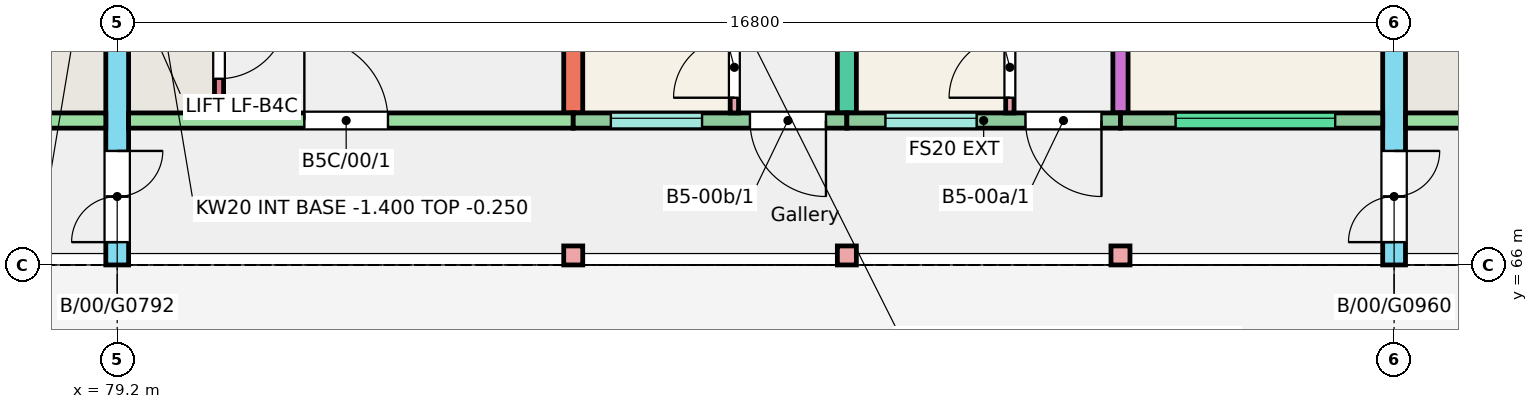
"""IFC4 building model, lengths in metres.
Left out: names, types, materials, properties, quantities, classifications, styles, units other than length and angle.
Written with IfcOpenShell. Run it as: python <this file> out.ifc"""

import sys

from ifc_helpers import new_model, si_unit, direction, frame, frame_2d, origin, origin_2d, place, context, subcontext, project, spatial, rectangle, extrude, element, fill, save


model = new_model("IFC4")
c1 = context("Model", 3, precision=1e-05, world=origin(), true_north=direction((0.0, 1.0)))
c2 = subcontext(c1, "Body", "Model", "MODEL_VIEW")
j1 = project(units=[si_unit("LENGTHUNIT", "METRE"), si_unit("PLANEANGLEUNIT", "RADIAN")], contexts=[c1])
p1 = place(None, origin())
s1 = spatial("IfcSite", under=j1, at=p1, CompositionType="ELEMENT")
p2 = place(p1, origin())
s2 = spatial("IfcBuilding", under=s1, at=p2, CompositionType="ELEMENT")
p3 = place(p2, origin())
s3 = spatial("IfcBuildingStorey", under=s2, at=p3, CompositionType="ELEMENT", Elevation=0.0)
p4 = place(p3, frame((79.2, 66.0, -0.25), z_axis=(0.0, 0.0, 1.0), x_axis=(0.0, 1.0, 0.0)))
e1 = element("IfcWall", 1, at=p4, inside=s3, PredefinedType="SHEAR", context=c2, shape_type="SweptSolid", body=[
    extrude(rectangle(XDim=11.0, YDim=0.3, at=frame_2d((5.5, 0.0))), origin(), (0.0, 0.0, 1.0), 3.25),
])
p5 = place(p4, frame((0.3, 0.0, 0.25)))
e2 = element("IfcOpeningElement", 2, at=p5, cuts=e1, PredefinedType="OPENING", context=c2, shape_type="SweptSolid", body=[
    extrude(rectangle(XDim=1.2, YDim=2.1, at=frame_2d((0.6, 1.05))), frame((0.0, 0.16, 0.0), z_axis=(0.0, -1.0, 0.0), x_axis=(1.0, 0.0, 0.0)), (0.0, 0.0, 1.0), 0.32),
])
for number, where, z_axis, x_axis in (
    (3, (85.2, 68.0, -0.25), (0.0, 0.0, 1.0), (0.0, 1.0, 0.0)),
    (4, (88.8, 68.0, -0.25), (0.0, 0.0, 1.0), (0.0, 1.0, 0.0)),
):
    element("IfcWall", number, at=place(p3, frame(where, z_axis=z_axis, x_axis=x_axis)), inside=s3, PredefinedType="SHEAR", context=c2, shape_type="SweptSolid", body=[
        extrude(rectangle(XDim=9.0, YDim=0.25, at=frame_2d((4.5, 0.0))), origin(), (0.0, 0.0, 1.0), 3.25),
    ])
p6 = place(p3, frame((92.4, 68.0, -0.25), z_axis=(0.0, 0.0, 1.0), x_axis=(0.0, 1.0, 0.0)))
e5 = element("IfcWall", 5, at=p6, inside=s3, PredefinedType="SHEAR", context=c2, shape_type="SweptSolid", body=[
    extrude(rectangle(XDim=9.0, YDim=0.2, at=frame_2d((4.5, 0.0))), origin(), (0.0, 0.0, 1.0), 3.25),
])
p7 = place(p6, frame((2.4, 0.0, 0.25)))
e6 = element("IfcOpeningElement", 6, at=p7, cuts=e5, PredefinedType="OPENING", context=c2, shape_type="SweptSolid", body=[
    extrude(rectangle(XDim=1.2, YDim=2.1, at=frame_2d((0.6, 1.05))), frame((0.0, 0.11, 0.0), z_axis=(0.0, -1.0, 0.0), x_axis=(1.0, 0.0, 0.0)), (0.0, 0.0, 1.0), 0.22),
])
p8 = place(p6, frame((6.4, 0.0, 0.25)))
e7 = element("IfcOpeningElement", 7, at=p8, cuts=e5, PredefinedType="OPENING", context=c2, shape_type="SweptSolid", body=[
    extrude(rectangle(XDim=1.2, YDim=2.1, at=frame_2d((0.6, 1.05))), frame((0.0, 0.11, 0.0), z_axis=(0.0, -1.0, 0.0), x_axis=(1.0, 0.0, 0.0)), (0.0, 0.0, 1.0), 0.22),
])
p9 = place(p3, frame((96.0, 66.0, -0.25), z_axis=(0.0, 0.0, 1.0), x_axis=(0.0, 1.0, 0.0)))
e8 = element("IfcWall", 8, at=p9, inside=s3, PredefinedType="SHEAR", context=c2, shape_type="SweptSolid", body=[
    extrude(rectangle(XDim=11.0, YDim=0.3, at=frame_2d((5.5, 0.0))), origin(), (0.0, 0.0, 1.0), 3.25),
])
p10 = place(p9, frame((0.3, 0.0, 0.25)))
e9 = element("IfcOpeningElement", 9, at=p10, cuts=e8, PredefinedType="OPENING", context=c2, shape_type="SweptSolid", body=[
    extrude(rectangle(XDim=1.2, YDim=2.1, at=frame_2d((0.6, 1.05))), frame((0.0, 0.16, 0.0), z_axis=(0.0, -1.0, 0.0), x_axis=(1.0, 0.0, 0.0)), (0.0, 0.0, 1.0), 0.32),
])
p11 = place(p3, frame((73.2, 67.9, -0.25), z_axis=(0.0, 0.0, 1.0), x_axis=(1.0, 0.0, 0.0)))
e10 = element("IfcWall", 10, at=p11, inside=s3, PredefinedType="SHEAR", context=c2, shape_type="SweptSolid", body=[
    extrude(rectangle(XDim=5.85, YDim=0.2, at=frame_2d((2.925, 0.0))), origin(), (0.0, 0.0, 1.0), 3.25),
])
p12 = place(p11, frame((2.438, 0.0, 0.25)))
e11 = element("IfcOpeningElement", 11, at=p12, cuts=e10, PredefinedType="OPENING", context=c2, shape_type="SweptSolid", body=[
    extrude(rectangle(XDim=1.1, YDim=2.1, at=frame_2d((0.55, 1.05))), frame((0.0, 0.11, 0.0), z_axis=(0.0, -1.0, 0.0), x_axis=(1.0, 0.0, 0.0)), (0.0, 0.0, 1.0), 0.22),
])
p13 = place(p3, frame((79.35, 67.9, -0.25), z_axis=(0.0, 0.0, 1.0), x_axis=(1.0, 0.0, 0.0)))
e12 = element("IfcWall", 12, at=p13, inside=s3, PredefinedType="SHEAR", context=c2, shape_type="SweptSolid", body=[
    extrude(rectangle(XDim=5.85, YDim=0.2, at=frame_2d((2.925, 0.0))), origin(), (0.0, 0.0, 1.0), 3.25),
])
p14 = place(p13, frame((2.312, 0.0, 0.25)))
e13 = element("IfcOpeningElement", 13, at=p14, cuts=e12, PredefinedType="OPENING", context=c2, shape_type="SweptSolid", body=[
    extrude(rectangle(XDim=1.1, YDim=2.1, at=frame_2d((0.55, 1.05))), frame((0.0, 0.11, 0.0), z_axis=(0.0, -1.0, 0.0), x_axis=(1.0, 0.0, 0.0)), (0.0, 0.0, 1.0), 0.22),
])
p15 = place(p3, frame((80.54, 68.0, -0.25), z_axis=(0.0, 0.0, 1.0), x_axis=(0.0, 1.0, 0.0)))
e14 = element("IfcWall", 14, at=p15, inside=s3, PredefinedType="SHEAR", context=c2, shape_type="SweptSolid", body=[
    extrude(rectangle(XDim=1.72, YDim=0.12, at=frame_2d((0.86, 0.0))), origin(), (0.0, 0.0, 1.0), 3.25),
])
p16 = place(p15, frame((0.45, 0.0, 0.25)))
e15 = element("IfcOpeningElement", 15, at=p16, cuts=e14, PredefinedType="OPENING", context=c2, shape_type="SweptSolid", body=[
    extrude(rectangle(XDim=0.9, YDim=2.1, at=frame_2d((0.45, 1.05))), frame((0.0, 0.07, 0.0), z_axis=(0.0, -1.0, 0.0), x_axis=(1.0, 0.0, 0.0)), (0.0, 0.0, 1.0), 0.14),
])
p17 = place(p3, frame((85.2, 67.9, -0.25), z_axis=(0.0, 0.0, 1.0), x_axis=(1.0, 0.0, 0.0)))
e16 = element("IfcWall", 16, at=p17, inside=s3, PredefinedType="SOLIDWALL", context=c2, shape_type="SweptSolid", body=[
    extrude(rectangle(XDim=3.6, YDim=0.2, at=frame_2d((1.8, 0.0))), origin(), (0.0, 0.0, 1.0), 3.25),
])
p18 = place(p17, frame((0.495, 0.0, 1.35)))
e17 = element("IfcOpeningElement", 17, at=p18, cuts=e16, PredefinedType="OPENING", context=c2, shape_type="SweptSolid", body=[
    extrude(rectangle(XDim=1.2, YDim=1.3, at=frame_2d((0.6, 0.65))), frame((0.0, 0.11, 0.0), z_axis=(0.0, -1.0, 0.0), x_axis=(1.0, 0.0, 0.0)), (0.0, 0.0, 1.0), 0.22),
])
p19 = place(p17, frame((2.325, 0.0, 0.25)))
e18 = element("IfcOpeningElement", 18, at=p19, cuts=e16, PredefinedType="OPENING", context=c2, shape_type="SweptSolid", body=[
    extrude(rectangle(XDim=1.0, YDim=2.1, at=frame_2d((0.5, 1.05))), frame((0.0, 0.11, 0.0), z_axis=(0.0, -1.0, 0.0), x_axis=(1.0, 0.0, 0.0)), (0.0, 0.0, 1.0), 0.22),
])
p20 = place(p3, frame((88.8, 67.9, -0.25), z_axis=(0.0, 0.0, 1.0), x_axis=(1.0, 0.0, 0.0)))
e19 = element("IfcWall", 19, at=p20, inside=s3, PredefinedType="SOLIDWALL", context=c2, shape_type="SweptSolid", body=[
    extrude(rectangle(XDim=3.6, YDim=0.2, at=frame_2d((1.8, 0.0))), origin(), (0.0, 0.0, 1.0), 3.25),
])
p21 = place(p20, frame((0.508, 0.0, 1.35)))
e20 = element("IfcOpeningElement", 20, at=p21, cuts=e19, PredefinedType="OPENING", context=c2, shape_type="SweptSolid", body=[
    extrude(rectangle(XDim=1.2, YDim=1.3, at=frame_2d((0.6, 0.65))), frame((0.0, 0.11, 0.0), z_axis=(0.0, -1.0, 0.0), x_axis=(1.0, 0.0, 0.0)), (0.0, 0.0, 1.0), 0.22),
])
p22 = place(p20, frame((2.35, 0.0, 0.25)))
e21 = element("IfcOpeningElement", 21, at=p22, cuts=e19, PredefinedType="OPENING", context=c2, shape_type="SweptSolid", body=[
    extrude(rectangle(XDim=1.0, YDim=2.1, at=frame_2d((0.5, 1.05))), frame((0.0, 0.11, 0.0), z_axis=(0.0, -1.0, 0.0), x_axis=(1.0, 0.0, 0.0)), (0.0, 0.0, 1.0), 0.22),
])
p23 = place(p3, frame((92.4, 67.9, -0.25), z_axis=(0.0, 0.0, 1.0), x_axis=(1.0, 0.0, 0.0)))
e22 = element("IfcWall", 22, at=p23, inside=s3, PredefinedType="SOLIDWALL", context=c2, shape_type="SweptSolid", body=[
    extrude(rectangle(XDim=3.45, YDim=0.2, at=frame_2d((1.725, 0.0))), origin(), (0.0, 0.0, 1.0), 3.25),
])
p24 = place(p23, frame((0.725, 0.0, 1.45)))
e23 = element("IfcOpeningElement", 23, at=p24, cuts=e22, PredefinedType="OPENING", context=c2, shape_type="SweptSolid", body=[
    extrude(rectangle(XDim=2.1, YDim=1.2, at=frame_2d((1.05, 0.6))), frame((0.0, 0.11, 0.0), z_axis=(0.0, -1.0, 0.0), x_axis=(1.0, 0.0, 0.0)), (0.0, 0.0, 1.0), 0.22),
])
p25 = place(p3, frame((96.15, 67.9, -0.25), z_axis=(0.0, 0.0, 1.0), x_axis=(1.0, 0.0, 0.0)))
e24 = element("IfcWall", 24, at=p25, inside=s3, PredefinedType="SHEAR", context=c2, shape_type="SweptSolid", body=[
    extrude(rectangle(XDim=5.85, YDim=0.2, at=frame_2d((2.925, 0.0))), origin(), (0.0, 0.0, 1.0), 3.25),
])
p26 = place(p25, frame((2.312, 0.0, 0.25)))
e25 = element("IfcOpeningElement", 25, at=p26, cuts=e24, PredefinedType="OPENING", context=c2, shape_type="SweptSolid", body=[
    extrude(rectangle(XDim=1.1, YDim=2.1, at=frame_2d((0.55, 1.05))), frame((0.0, 0.11, 0.0), z_axis=(0.0, -1.0, 0.0), x_axis=(1.0, 0.0, 0.0)), (0.0, 0.0, 1.0), 0.22),
])
for number, where, z_axis, x_axis in (
    (26, (85.2, 66.125, -0.25), (0.0, 0.0, 1.0), (1.0, 0.0, 0.0)),
    (27, (88.8, 66.125, -0.25), (0.0, 0.0, 1.0), (1.0, 0.0, 0.0)),
    (28, (92.4, 66.125, -0.25), (0.0, 0.0, 1.0), (1.0, 0.0, 0.0)),
):
    element("IfcColumn", number, at=place(p3, frame(where, z_axis=z_axis, x_axis=x_axis)), inside=s3, PredefinedType="COLUMN", context=c2, shape_type="SweptSolid", body=[
        extrude(rectangle(XDim=0.25, YDim=0.25, at=origin_2d()), origin(), (0.0, 0.0, 1.0), 3.25),
    ])
p27 = place(p3, frame((90.945, 68.0, 0.0), z_axis=(0.0, 0.0, 1.0), x_axis=(0.0, 1.0, 0.0)))
e29 = element("IfcWall", 29, at=p27, inside=s3, PredefinedType="PARTITIONING", context=c2, shape_type="SweptSolid", body=[
    extrude(rectangle(XDim=4.7, YDim=0.11, at=frame_2d((2.35, 0.0))), origin(), (0.0, 0.0, 1.0), 2.8),
])
p28 = place(p27, frame((0.2, 0.0, 0.0)))
e30 = element("IfcOpeningElement", 30, at=p28, cuts=e29, PredefinedType="OPENING", context=c2, shape_type="SweptSolid", body=[
    extrude(rectangle(XDim=0.8, YDim=2.1, at=frame_2d((0.4, 1.05))), frame((0.0, 0.065, 0.0), z_axis=(0.0, -1.0, 0.0), x_axis=(1.0, 0.0, 0.0)), (0.0, 0.0, 1.0), 0.13),
])
p29 = place(p27, frame((3.75, 0.0, 0.0)))
e31 = element("IfcOpeningElement", 31, at=p29, cuts=e29, PredefinedType="OPENING", context=c2, shape_type="SweptSolid", body=[
    extrude(rectangle(XDim=0.8, YDim=2.1, at=frame_2d((0.4, 1.05))), frame((0.0, 0.065, 0.0), z_axis=(0.0, -1.0, 0.0), x_axis=(1.0, 0.0, 0.0)), (0.0, 0.0, 1.0), 0.13),
])
p30 = place(p3, frame((87.32, 68.0, 0.0), z_axis=(0.0, 0.0, 1.0), x_axis=(0.0, 1.0, 0.0)))
e32 = element("IfcWall", 32, at=p30, inside=s3, PredefinedType="PARTITIONING", context=c2, shape_type="SweptSolid", body=[
    extrude(rectangle(XDim=4.7, YDim=0.11, at=frame_2d((2.35, 0.0))), origin(), (0.0, 0.0, 1.0), 2.8),
])
p31 = place(p30, frame((0.2, 0.0, 0.0)))
e33 = element("IfcOpeningElement", 33, at=p31, cuts=e32, PredefinedType="OPENING", context=c2, shape_type="SweptSolid", body=[
    extrude(rectangle(XDim=0.8, YDim=2.1, at=frame_2d((0.4, 1.05))), frame((0.0, 0.065, 0.0), z_axis=(0.0, -1.0, 0.0), x_axis=(1.0, 0.0, 0.0)), (0.0, 0.0, 1.0), 0.13),
])
p32 = place(p30, frame((3.75, 0.0, 0.0)))
e34 = element("IfcOpeningElement", 34, at=p32, cuts=e32, PredefinedType="OPENING", context=c2, shape_type="SweptSolid", body=[
    extrude(rectangle(XDim=0.8, YDim=2.1, at=frame_2d((0.4, 1.05))), frame((0.0, 0.065, 0.0), z_axis=(0.0, -1.0, 0.0), x_axis=(1.0, 0.0, 0.0)), (0.0, 0.0, 1.0), 0.13),
])
p33 = place(p24, origin())
e35 = element("IfcWindow", 35, at=p33, inside=s3, PartitioningType="SINGLE_PANEL", PredefinedType="WINDOW", context=c2, shape_type="SweptSolid", body=[
    extrude(rectangle(XDim=2.1, YDim=1.2, at=frame_2d((1.05, 0.6))), frame((0.0, 0.06, 0.0), z_axis=(0.0, -1.0, 0.0), x_axis=(1.0, 0.0, 0.0)), (0.0, 0.0, 1.0), 0.06),
])
fill(e23, e35)
p34 = place(p21, origin())
e36 = element("IfcWindow", 36, at=p34, inside=s3, PartitioningType="SINGLE_PANEL", PredefinedType="WINDOW", context=c2, shape_type="SweptSolid", body=[
    extrude(rectangle(XDim=1.2, YDim=1.3, at=frame_2d((0.6, 0.65))), frame((0.0, 0.06, 0.0), z_axis=(0.0, -1.0, 0.0), x_axis=(1.0, 0.0, 0.0)), (0.0, 0.0, 1.0), 0.06),
])
fill(e20, e36)
p35 = place(p18, origin())
e37 = element("IfcWindow", 37, at=p35, inside=s3, PartitioningType="SINGLE_PANEL", PredefinedType="WINDOW", context=c2, shape_type="SweptSolid", body=[
    extrude(rectangle(XDim=1.2, YDim=1.3, at=frame_2d((0.6, 0.65))), frame((0.0, 0.06, 0.0), z_axis=(0.0, -1.0, 0.0), x_axis=(1.0, 0.0, 0.0)), (0.0, 0.0, 1.0), 0.06),
])
fill(e17, e37)
p36 = place(p22, origin())
e38 = element("IfcDoor", 38, at=p36, inside=s3, OperationType="SINGLE_SWING_RIGHT", PredefinedType="DOOR", context=c2, shape_type="SweptSolid", body=[
    extrude(rectangle(XDim=1.0, YDim=2.1, at=frame_2d((0.5, 1.05))), frame((0.0, 0.025, 0.0), z_axis=(0.0, -1.0, 0.0), x_axis=(1.0, 0.0, 0.0)), (0.0, 0.0, 1.0), 0.05),
])
fill(e21, e38)
p37 = place(p28, origin())
e39 = element("IfcDoor", 39, at=p37, inside=s3, OperationType="SINGLE_SWING_LEFT", PredefinedType="DOOR", context=c2, shape_type="SweptSolid", body=[
    extrude(rectangle(XDim=0.8, YDim=2.1, at=frame_2d((0.4, 1.05))), frame((0.0, 0.025, 0.0), z_axis=(0.0, -1.0, 0.0), x_axis=(1.0, 0.0, 0.0)), (0.0, 0.0, 1.0), 0.05),
])
fill(e30, e39)
p38 = place(p19, origin())
e40 = element("IfcDoor", 40, at=p38, inside=s3, OperationType="SINGLE_SWING_RIGHT", PredefinedType="DOOR", context=c2, shape_type="SweptSolid", body=[
    extrude(rectangle(XDim=1.0, YDim=2.1, at=frame_2d((0.5, 1.05))), frame((0.0, 0.025, 0.0), z_axis=(0.0, -1.0, 0.0), x_axis=(1.0, 0.0, 0.0)), (0.0, 0.0, 1.0), 0.05),
])
fill(e18, e40)
p39 = place(p31, origin())
e41 = element("IfcDoor", 41, at=p39, inside=s3, OperationType="SINGLE_SWING_LEFT", PredefinedType="DOOR", context=c2, shape_type="SweptSolid", body=[
    extrude(rectangle(XDim=0.8, YDim=2.1, at=frame_2d((0.4, 1.05))), frame((0.0, 0.025, 0.0), z_axis=(0.0, -1.0, 0.0), x_axis=(1.0, 0.0, 0.0)), (0.0, 0.0, 1.0), 0.05),
])
fill(e33, e41)
p40 = place(p14, origin())
e42 = element("IfcDoor", 42, at=p40, inside=s3, OperationType="SINGLE_SWING_LEFT", PredefinedType="DOOR", context=c2, shape_type="SweptSolid", body=[
    extrude(rectangle(XDim=1.1, YDim=2.1, at=frame_2d((0.55, 1.05))), frame((0.0, 0.025, 0.0), z_axis=(0.0, -1.0, 0.0), x_axis=(1.0, 0.0, 0.0)), (0.0, 0.0, 1.0), 0.05),
])
fill(e13, e42)
p41 = place(p16, origin())
e43 = element("IfcDoor", 43, at=p41, inside=s3, OperationType="SINGLE_SWING_RIGHT", PredefinedType="DOOR", context=c2, shape_type="SweptSolid", body=[
    extrude(rectangle(XDim=0.9, YDim=2.1, at=frame_2d((0.45, 1.05))), frame((0.0, 0.025, 0.0), z_axis=(0.0, -1.0, 0.0), x_axis=(1.0, 0.0, 0.0)), (0.0, 0.0, 1.0), 0.05),
])
fill(e15, e43)
p42 = place(p5, origin())
e44 = element("IfcDoor", 44, at=p42, inside=s3, OperationType="DOUBLE_DOOR_SINGLE_SWING", PredefinedType="DOOR", context=c2, shape_type="SweptSolid", body=[
    extrude(rectangle(XDim=1.2, YDim=2.1, at=frame_2d((0.6, 1.05))), frame((0.0, 0.025, 0.0), z_axis=(0.0, -1.0, 0.0), x_axis=(1.0, 0.0, 0.0)), (0.0, 0.0, 1.0), 0.05),
])
fill(e2, e44)
p43 = place(p10, origin())
e45 = element("IfcDoor", 45, at=p43, inside=s3, OperationType="DOUBLE_DOOR_SINGLE_SWING", PredefinedType="DOOR", context=c2, shape_type="SweptSolid", body=[
    extrude(rectangle(XDim=1.2, YDim=2.1, at=frame_2d((0.6, 1.05))), frame((0.0, 0.025, 0.0), z_axis=(0.0, -1.0, 0.0), x_axis=(1.0, 0.0, 0.0)), (0.0, 0.0, 1.0), 0.05),
])
fill(e9, e45)
save(model, sys.argv[1])
